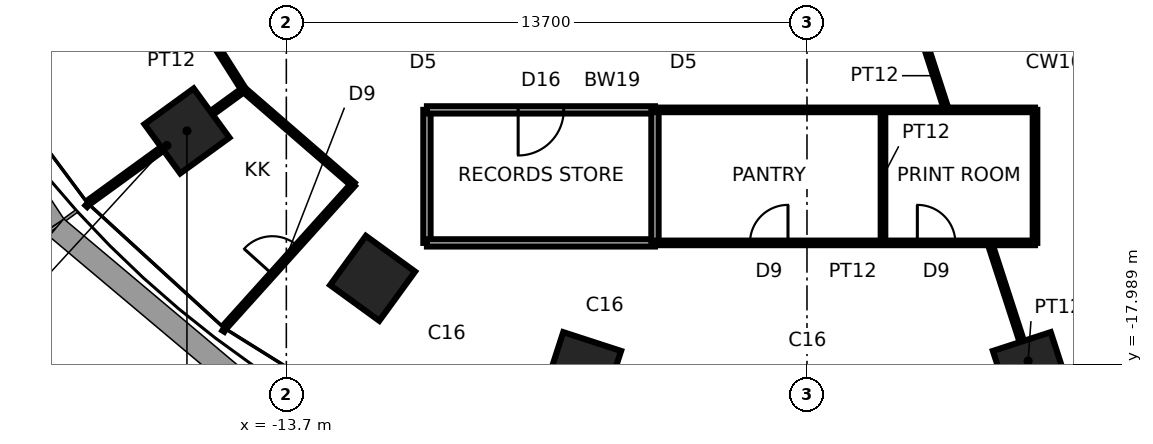
"""IFC4 building model, lengths in metres.
Left out: names, types, materials, properties, quantities, classifications, styles, units other than length and angle.
Written with IfcOpenShell. Run it as: python <this file> out.ifc"""

import sys

from ifc_helpers import new_model, si_unit, direction, frame, frame_2d, origin, origin_2d, place, context, subcontext, project, spatial, rectangle, extrude, element, fill, save


model = new_model("IFC4")
c1 = context("Model", 3, precision=1e-05, world=origin(), true_north=direction((0.0, 1.0)))
c2 = subcontext(c1, "Body", "Model", "MODEL_VIEW")
j1 = project(units=[si_unit("LENGTHUNIT", "METRE"), si_unit("PLANEANGLEUNIT", "RADIAN")], contexts=[c1])
p1 = place(None, origin())
s1 = spatial("IfcSite", under=j1, at=p1, CompositionType="ELEMENT")
p2 = place(p1, origin())
s2 = spatial("IfcBuilding", under=s1, at=p2, CompositionType="ELEMENT")
p3 = place(p2, frame((0.0, 0.0, 96.3)))
s3 = spatial("IfcBuildingStorey", under=s2, at=p3, CompositionType="ELEMENT", Elevation=96.3)
for number, where, z_axis, x_axis in (
    (1, (-16.315, -11.854, 0.0), (0.0, 0.0, 1.0), (-0.809, -0.588, 0.0)),
    (2, (-11.43, -15.733, 0.0), (0.0, 0.0, 1.0), (-0.588, -0.809, 0.0)),
    (3, (-5.9, -18.157, 0.0), (0.0, 0.0, 1.0), (-0.309, -0.951, 0.0)),
    (4, (5.9, -18.157, 0.0), (0.0, 0.0, 1.0), (0.309, -0.951, 0.0)),
):
    element("IfcColumn", number, at=place(p3, frame(where, z_axis=z_axis, x_axis=x_axis)), inside=s3, PredefinedType="COLUMN", context=c2, shape_type="SweptSolid", body=[
        extrude(rectangle(XDim=1.6, YDim=1.6, at=origin_2d()), origin(), (0.0, 0.0, 1.0), 3.9),
    ])
p4 = place(p3, frame((-14.821, -10.768, 0.0), z_axis=(0.0, 0.0, 1.0), x_axis=(-0.534710673456, 0.845035203818, 0.0)))
e5 = element("IfcWall", 5, at=p4, inside=s3, PredefinedType="PARTITIONING", context=c2, shape_type="SweptSolid", body=[
    extrude(rectangle(XDim=7.946, YDim=0.12, at=frame_2d((3.973, 0.0))), origin(), (0.0, 0.0, 1.0), 3.74),
])
p5 = place(p4, frame((3.473, 0.0, 0.0)))
e6 = element("IfcOpeningElement", 6, at=p5, cuts=e5, PredefinedType="OPENING", context=c2, shape_type="SweptSolid", body=[
    extrude(rectangle(XDim=1.0, YDim=2.4, at=frame_2d((0.5, 1.2))), frame((0.0, 0.07, 0.0), z_axis=(0.0, -1.0, 0.0), x_axis=(1.0, 0.0, 0.0)), (0.0, 0.0, 1.0), 0.14),
])
p6 = place(p3, frame((-14.821, -10.768, 0.0), z_axis=(0.0, 0.0, 1.0), x_axis=(-0.809042143657, -0.587750635718, 0.0)))
e7 = element("IfcWall", 7, at=p6, inside=s3, PredefinedType="PARTITIONING", context=c2, shape_type="SweptSolid", body=[
    extrude(rectangle(XDim=5.0, YDim=0.12, at=frame_2d((2.5, 0.0))), origin(), (0.0, 0.0, 1.0), 2.94),
])
p7 = place(p3, frame((-11.942, -13.263, 0.0), z_axis=(0.0, 0.0, 1.0), x_axis=(-0.755744060509, 0.654867097208, 0.0)))
e8 = element("IfcWall", 8, at=p7, inside=s3, PredefinedType="PARTITIONING", context=c2, shape_type="SweptSolid", body=[
    extrude(rectangle(XDim=3.809, YDim=0.12, at=frame_2d((1.905, 0.0))), origin(), (0.0, 0.0, 1.0), 3.74),
])
p8 = place(p3, frame((-15.288, -16.979, 0.0), z_axis=(0.0, 0.0, 1.0), x_axis=(0.669126573551, 0.743148456614, 0.0)))
e9 = element("IfcWall", 9, at=p8, inside=s3, PredefinedType="PARTITIONING", context=c2, shape_type="SweptSolid", body=[
    extrude(rectangle(XDim=5.0, YDim=0.12, at=frame_2d((2.5, 0.0))), origin(), (0.0, 0.0, 1.0), 3.74),
])
p9 = place(p8, frame((1.822, 0.0, 0.0)))
e10 = element("IfcOpeningElement", 10, at=p9, cuts=e9, PredefinedType="OPENING", context=c2, shape_type="SweptSolid", body=[
    extrude(rectangle(XDim=1.0, YDim=2.4, at=frame_2d((0.5, 1.2))), frame((0.0, 0.07, 0.0), z_axis=(0.0, -1.0, 0.0), x_axis=(1.0, 0.0, 0.0)), (0.0, 0.0, 1.0), 0.14),
])
p10 = place(p3, frame((-10.0, -11.3, 0.0), z_axis=(0.0, 0.0, 1.0), x_axis=(0.0, -1.0, 0.0)))
e11 = element("IfcWall", 11, at=p10, inside=s3, PredefinedType="SOLIDWALL", context=c2, shape_type="SweptSolid", body=[
    extrude(rectangle(XDim=3.5, YDim=0.19, at=frame_2d((1.75, 0.0))), origin(), (0.0, 0.0, 1.0), 3.74),
])
p11 = place(p3, frame((-4.0, -11.3, 0.0), z_axis=(0.0, 0.0, 1.0), x_axis=(-1.0, 0.0, 0.0)))
e12 = element("IfcWall", 12, at=p11, inside=s3, PredefinedType="SOLIDWALL", context=c2, shape_type="SweptSolid", body=[
    extrude(rectangle(XDim=6.0, YDim=0.19, at=frame_2d((3.0, 0.0))), origin(), (0.0, 0.0, 1.0), 3.74),
])
p12 = place(p11, frame((2.4, 0.0, 0.0)))
e13 = element("IfcOpeningElement", 13, at=p12, cuts=e12, PredefinedType="OPENING", context=c2, shape_type="SweptSolid", body=[
    extrude(rectangle(XDim=1.2, YDim=2.1, at=frame_2d((0.6, 1.05))), frame((0.0, 0.105, 0.0), z_axis=(0.0, -1.0, 0.0), x_axis=(1.0, 0.0, 0.0)), (0.0, 0.0, 1.0), 0.21),
])
p13 = place(p3, frame((-10.0, -14.8, 0.0), z_axis=(0.0, 0.0, 1.0), x_axis=(1.0, 0.0, 0.0)))
e14 = element("IfcWall", 14, at=p13, inside=s3, PredefinedType="SOLIDWALL", context=c2, shape_type="SweptSolid", body=[
    extrude(rectangle(XDim=6.0, YDim=0.19, at=frame_2d((3.0, 0.0))), origin(), (0.0, 0.0, 1.0), 3.74),
])
p14 = place(p3, frame((-4.0, -11.3, 0.0), z_axis=(0.0, 0.0, 1.0), x_axis=(0.0, -1.0, 0.0)))
e15 = element("IfcWall", 15, at=p14, inside=s3, PredefinedType="SOLIDWALL", context=c2, shape_type="SweptSolid", body=[
    extrude(rectangle(XDim=3.5, YDim=0.19, at=frame_2d((1.75, 0.0))), origin(), (0.0, 0.0, 1.0), 3.74),
])
p15 = place(p3, frame((-4.0, -14.8, 0.0), z_axis=(0.0, 0.0, 1.0), x_axis=(1.0, 0.0, 0.0)))
e16 = element("IfcWall", 16, at=p15, inside=s3, PredefinedType="PARTITIONING", context=c2, shape_type="SweptSolid", body=[
    extrude(rectangle(XDim=10.0, YDim=0.12, at=frame_2d((5.0, 0.0))), origin(), (0.0, 0.0, 1.0), 3.74),
])
p16 = place(p15, frame((2.5, 0.0, 0.0)))
e17 = element("IfcOpeningElement", 17, at=p16, cuts=e16, PredefinedType="OPENING", context=c2, shape_type="SweptSolid", body=[
    extrude(rectangle(XDim=1.0, YDim=2.4, at=frame_2d((0.5, 1.2))), frame((0.0, 0.07, 0.0), z_axis=(0.0, -1.0, 0.0), x_axis=(1.0, 0.0, 0.0)), (0.0, 0.0, 1.0), 0.14),
])
p17 = place(p15, frame((6.904, 0.0, 0.0)))
e18 = element("IfcOpeningElement", 18, at=p17, cuts=e16, PredefinedType="OPENING", context=c2, shape_type="SweptSolid", body=[
    extrude(rectangle(XDim=1.0, YDim=2.4, at=frame_2d((0.5, 1.2))), frame((0.0, 0.07, 0.0), z_axis=(0.0, -1.0, 0.0), x_axis=(1.0, 0.0, 0.0)), (0.0, 0.0, 1.0), 0.14),
])
p18 = place(p3, frame((6.0, -11.3, 0.0), z_axis=(0.0, 0.0, 1.0), x_axis=(-1.0, 0.0, 0.0)))
e19 = element("IfcWall", 19, at=p18, inside=s3, PredefinedType="PARTITIONING", context=c2, shape_type="SweptSolid", body=[
    extrude(rectangle(XDim=10.0, YDim=0.12, at=frame_2d((5.0, 0.0))), origin(), (0.0, 0.0, 1.0), 3.74),
])
p19 = place(p3, frame((2.0, -11.3, 0.0), z_axis=(0.0, 0.0, 1.0), x_axis=(0.0, -1.0, 0.0)))
e20 = element("IfcWall", 20, at=p19, inside=s3, PredefinedType="PARTITIONING", context=c2, shape_type="SweptSolid", body=[
    extrude(rectangle(XDim=3.5, YDim=0.12, at=frame_2d((1.75, 0.0))), origin(), (0.0, 0.0, 1.0), 3.74),
])
p20 = place(p3, frame((3.672, -11.3, 0.0), z_axis=(0.0, 0.0, 1.0), x_axis=(-0.309059822154, 0.95104259964, 0.0)))
e21 = element("IfcWall", 21, at=p20, inside=s3, PredefinedType="PARTITIONING", context=c2, shape_type="SweptSolid", body=[
    extrude(rectangle(XDim=1.893, YDim=0.12, at=frame_2d((0.946, 0.0))), origin(), (0.0, 0.0, 1.0), 2.94),
])
p21 = place(p3, frame((6.829, -21.016, 0.0), z_axis=(0.0, 0.0, 1.0), x_axis=(-0.309024414348, 0.951054105368, 0.0)))
e22 = element("IfcWall", 22, at=p21, inside=s3, PredefinedType="PARTITIONING", context=c2, shape_type="SweptSolid", body=[
    extrude(rectangle(XDim=6.536, YDim=0.12, at=frame_2d((3.268, 0.0))), origin(), (0.0, 0.0, 1.0), 2.94),
])
p22 = place(p3, frame((6.0, -14.8, 0.0), z_axis=(0.0, 0.0, 1.0), x_axis=(0.0, 1.0, 0.0)))
e23 = element("IfcWall", 23, at=p22, inside=s3, PredefinedType="PARTITIONING", context=c2, shape_type="SweptSolid", body=[
    extrude(rectangle(XDim=3.5, YDim=0.12, at=frame_2d((1.75, 0.0))), origin(), (0.0, 0.0, 1.0), 3.74),
])
p23 = place(p9, origin())
e24 = element("IfcDoor", 24, at=p23, inside=s3, OperationType="SINGLE_SWING_LEFT", PredefinedType="DOOR", context=c2, shape_type="SweptSolid", body=[
    extrude(rectangle(XDim=1.0, YDim=2.4, at=frame_2d((0.5, 1.2))), frame((0.0, 0.025, 0.0), z_axis=(0.0, -1.0, 0.0), x_axis=(1.0, 0.0, 0.0)), (0.0, 0.0, 1.0), 0.05),
])
fill(e10, e24)
p24 = place(p12, origin())
e25 = element("IfcDoor", 25, at=p24, inside=s3, OperationType="SINGLE_SWING_RIGHT", PredefinedType="DOOR", context=c2, shape_type="SweptSolid", body=[
    extrude(rectangle(XDim=1.2, YDim=2.1, at=frame_2d((0.6, 1.05))), frame((0.0, 0.025, 0.0), z_axis=(0.0, -1.0, 0.0), x_axis=(1.0, 0.0, 0.0)), (0.0, 0.0, 1.0), 0.05),
])
fill(e13, e25)
p25 = place(p16, origin())
e26 = element("IfcDoor", 26, at=p25, inside=s3, OperationType="SINGLE_SWING_RIGHT", PredefinedType="DOOR", context=c2, shape_type="SweptSolid", body=[
    extrude(rectangle(XDim=1.0, YDim=2.4, at=frame_2d((0.5, 1.2))), frame((0.0, 0.025, 0.0), z_axis=(0.0, -1.0, 0.0), x_axis=(1.0, 0.0, 0.0)), (0.0, 0.0, 1.0), 0.05),
])
fill(e17, e26)
p26 = place(p17, origin())
e27 = element("IfcDoor", 27, at=p26, inside=s3, OperationType="SINGLE_SWING_LEFT", PredefinedType="DOOR", context=c2, shape_type="SweptSolid", body=[
    extrude(rectangle(XDim=1.0, YDim=2.4, at=frame_2d((0.5, 1.2))), frame((0.0, 0.025, 0.0), z_axis=(0.0, -1.0, 0.0), x_axis=(1.0, 0.0, 0.0)), (0.0, 0.0, 1.0), 0.05),
])
fill(e18, e27)
save(model, sys.argv[1])
